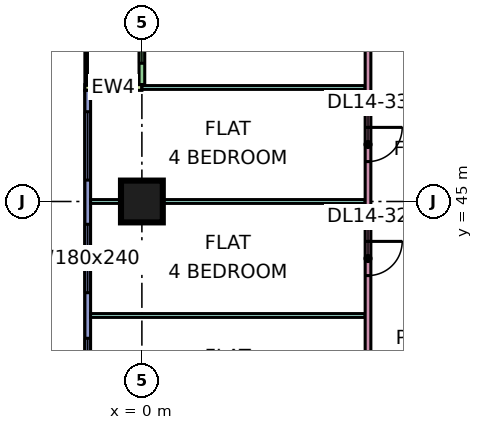
"""IFC4 building model, lengths in metres.
Left out: names, types, materials, properties, quantities, classifications, styles, units other than length and angle.
Written with IfcOpenShell. Run it as: python <this file> out.ifc"""

import sys

from ifc_helpers import new_model, si_unit, direction, frame, frame_2d, origin, origin_2d, place, context, subcontext, project, spatial, rectangle, extrude, element, fill, save


model = new_model("IFC4")
c1 = context("Model", 3, precision=1e-05, world=origin(), true_north=direction((0.0, 1.0)))
c2 = subcontext(c1, "Body", "Model", "MODEL_VIEW")
j1 = project(units=[si_unit("LENGTHUNIT", "METRE"), si_unit("PLANEANGLEUNIT", "RADIAN")], contexts=[c1])
p1 = place(None, origin())
s1 = spatial("IfcSite", under=j1, at=p1, CompositionType="ELEMENT")
p2 = place(p1, origin())
s2 = spatial("IfcBuilding", under=s1, at=p2, CompositionType="ELEMENT")
p3 = place(p2, frame((0.0, 0.0, 67.65)))
s3 = spatial("IfcBuildingStorey", under=s2, at=p3, CompositionType="ELEMENT", Elevation=67.65)
p4 = place(p3, frame((0.0, 45.0, 0.0), z_axis=(0.0, 0.0, 1.0), x_axis=(1.0, 0.0, 0.0)))
e1 = element("IfcColumn", 1, at=p4, inside=s3, PredefinedType="COLUMN", context=c2, shape_type="SweptSolid", body=[
    extrude(rectangle(XDim=1.1, YDim=1.1, at=origin_2d()), origin(), (0.0, 0.0, 1.0), 3.75),
])
p5 = place(p3, frame((0.0, 61.425, 0.0), z_axis=(0.0, 0.0, 1.0), x_axis=(0.0, -1.0, 0.0)))
e2 = element("IfcWall", 2, at=p5, inside=s3, PredefinedType="SOLIDWALL", context=c2, shape_type="SweptSolid", body=[
    extrude(rectangle(XDim=13.35, YDim=0.15, at=frame_2d((6.675, 0.0))), origin(), (0.0, 0.0, 1.0), 3.35),
])
p6 = place(p5, frame((1.312, 0.0, 0.0)))
e3 = element("IfcOpeningElement", 3, at=p6, cuts=e2, PredefinedType="OPENING", context=c2, shape_type="SweptSolid", body=[
    extrude(rectangle(XDim=1.8, YDim=2.4, at=frame_2d((0.9, 1.2))), frame((0.0, 0.085, 0.0), z_axis=(0.0, -1.0, 0.0), x_axis=(1.0, 0.0, 0.0)), (0.0, 0.0, 1.0), 0.17),
])
p7 = place(p5, frame((5.0, 0.0, 0.45)))
e4 = element("IfcOpeningElement", 4, at=p7, cuts=e2, PredefinedType="OPENING", context=c2, shape_type="SweptSolid", body=[
    extrude(rectangle(XDim=1.2, YDim=2.4, at=frame_2d((0.6, 1.2))), frame((0.0, 0.085, 0.0), z_axis=(0.0, -1.0, 0.0), x_axis=(1.0, 0.0, 0.0)), (0.0, 0.0, 1.0), 0.17),
])
p8 = place(p5, frame((8.65, 0.0, 0.45)))
e5 = element("IfcOpeningElement", 5, at=p8, cuts=e2, PredefinedType="OPENING", context=c2, shape_type="SweptSolid", body=[
    extrude(rectangle(XDim=1.2, YDim=2.4, at=frame_2d((0.6, 1.2))), frame((0.0, 0.085, 0.0), z_axis=(0.0, -1.0, 0.0), x_axis=(1.0, 0.0, 0.0)), (0.0, 0.0, 1.0), 0.17),
])
p9 = place(p5, frame((10.988, 0.0, 0.45)))
e6 = element("IfcOpeningElement", 6, at=p9, cuts=e2, PredefinedType="OPENING", context=c2, shape_type="SweptSolid", body=[
    extrude(rectangle(XDim=1.8, YDim=2.4, at=frame_2d((0.9, 1.2))), frame((0.0, 0.085, 0.0), z_axis=(0.0, -1.0, 0.0), x_axis=(1.0, 0.0, 0.0)), (0.0, 0.0, 1.0), 0.17),
])
p10 = place(p3, frame((-1.5, 48.0, 0.0), z_axis=(0.0, 0.0, 1.0), x_axis=(1.0, 0.0, 0.0)))
e7 = element("IfcWall", 7, at=p10, inside=s3, PredefinedType="SOLIDWALL", context=c2, shape_type="SweptSolid", body=[
    extrude(rectangle(XDim=1.5, YDim=0.15, at=frame_2d((0.75, 0.0))), origin(), (0.0, 0.0, 1.0), 3.35),
])
p11 = place(p3, frame((-1.425, 47.925, 0.0), z_axis=(0.0, 0.0, 1.0), x_axis=(0.0, -1.0, 0.0)))
e8 = element("IfcWall", 8, at=p11, inside=s3, PredefinedType="SOLIDWALL", context=c2, shape_type="SweptSolid", body=[
    extrude(rectangle(XDim=11.85, YDim=0.15, at=frame_2d((5.925, 0.0))), origin(), (0.0, 0.0, 1.0), 3.35),
])
p12 = place(p11, frame((0.562, 0.0, 0.45)))
e9 = element("IfcOpeningElement", 9, at=p12, cuts=e8, PredefinedType="OPENING", context=c2, shape_type="SweptSolid", body=[
    extrude(rectangle(XDim=1.8, YDim=2.4, at=frame_2d((0.9, 1.2))), frame((0.0, 0.085, 0.0), z_axis=(0.0, -1.0, 0.0), x_axis=(1.0, 0.0, 0.0)), (0.0, 0.0, 1.0), 0.17),
])
p13 = place(p11, frame((3.525, 0.0, 0.45)))
e10 = element("IfcOpeningElement", 10, at=p13, cuts=e8, PredefinedType="OPENING", context=c2, shape_type="SweptSolid", body=[
    extrude(rectangle(XDim=1.8, YDim=2.4, at=frame_2d((0.9, 1.2))), frame((0.0, 0.085, 0.0), z_axis=(0.0, -1.0, 0.0), x_axis=(1.0, 0.0, 0.0)), (0.0, 0.0, 1.0), 0.17),
])
p14 = place(p11, frame((6.525, 0.0, 0.45)))
e11 = element("IfcOpeningElement", 11, at=p14, cuts=e8, PredefinedType="OPENING", context=c2, shape_type="SweptSolid", body=[
    extrude(rectangle(XDim=1.8, YDim=2.4, at=frame_2d((0.9, 1.2))), frame((0.0, 0.085, 0.0), z_axis=(0.0, -1.0, 0.0), x_axis=(1.0, 0.0, 0.0)), (0.0, 0.0, 1.0), 0.17),
])
p15 = place(p11, frame((9.488, 0.0, 0.45)))
e12 = element("IfcOpeningElement", 12, at=p15, cuts=e8, PredefinedType="OPENING", context=c2, shape_type="SweptSolid", body=[
    extrude(rectangle(XDim=1.8, YDim=2.4, at=frame_2d((0.9, 1.2))), frame((0.0, 0.085, 0.0), z_axis=(0.0, -1.0, 0.0), x_axis=(1.0, 0.0, 0.0)), (0.0, 0.0, 1.0), 0.17),
])
for number, where, z_axis, x_axis in (
    (13, (-1.351, 42.0, 0.0), (0.0, 0.0, 1.0), (1.0, 0.0, 0.0)),
    (14, (-1.351, 45.0, 0.0), (0.0, 0.0, 1.0), (1.0, 0.0, 0.0)),
):
    element("IfcWall", number, at=place(p3, frame(where, z_axis=z_axis, x_axis=x_axis)), inside=s3, PredefinedType="PARTITIONING", context=c2, shape_type="SweptSolid", body=[
        extrude(rectangle(XDim=7.226, YDim=0.1, at=frame_2d((3.613, 0.0))), origin(), (0.0, 0.0, 1.0), 3.35),
    ])
p16 = place(p3, frame((0.0, 48.0, 0.0), z_axis=(0.0, 0.0, 1.0), x_axis=(1.0, 0.0, 0.0)))
e15 = element("IfcWall", 15, at=p16, inside=s3, PredefinedType="PARTITIONING", context=c2, shape_type="SweptSolid", body=[
    extrude(rectangle(XDim=5.875, YDim=0.1, at=frame_2d((2.938, 0.0))), origin(), (0.0, 0.0, 1.0), 3.35),
])
p17 = place(p3, frame((5.95, 36.1, 0.0), z_axis=(0.0, 0.0, 1.0), x_axis=(0.0, 1.0, 0.0)))
e16 = element("IfcWall", 16, at=p17, inside=s3, PredefinedType="PARTITIONING", context=c2, shape_type="SweptSolid", body=[
    extrude(rectangle(XDim=26.826, YDim=0.15, at=frame_2d((13.413, 0.0))), origin(), (0.0, 0.0, 1.0), 3.35),
])
p18 = place(p17, frame((0.95, 0.0, 0.0)))
e17 = element("IfcOpeningElement", 17, at=p18, cuts=e16, PredefinedType="OPENING", context=c2, shape_type="SweptSolid", body=[
    extrude(rectangle(XDim=0.9, YDim=2.1, at=frame_2d((0.45, 1.05))), frame((0.0, 0.085, 0.0), z_axis=(0.0, -1.0, 0.0), x_axis=(1.0, 0.0, 0.0)), (0.0, 0.0, 1.0), 0.17),
])
p19 = place(p17, frame((3.95, 0.0, 0.0)))
e18 = element("IfcOpeningElement", 18, at=p19, cuts=e16, PredefinedType="OPENING", context=c2, shape_type="SweptSolid", body=[
    extrude(rectangle(XDim=0.9, YDim=2.1, at=frame_2d((0.45, 1.05))), frame((0.0, 0.085, 0.0), z_axis=(0.0, -1.0, 0.0), x_axis=(1.0, 0.0, 0.0)), (0.0, 0.0, 1.0), 0.17),
])
p20 = place(p17, frame((6.95, 0.0, 0.0)))
e19 = element("IfcOpeningElement", 19, at=p20, cuts=e16, PredefinedType="OPENING", context=c2, shape_type="SweptSolid", body=[
    extrude(rectangle(XDim=0.9, YDim=2.1, at=frame_2d((0.45, 1.05))), frame((0.0, 0.085, 0.0), z_axis=(0.0, -1.0, 0.0), x_axis=(1.0, 0.0, 0.0)), (0.0, 0.0, 1.0), 0.17),
])
p21 = place(p17, frame((9.95, 0.0, 0.0)))
e20 = element("IfcOpeningElement", 20, at=p21, cuts=e16, PredefinedType="OPENING", context=c2, shape_type="SweptSolid", body=[
    extrude(rectangle(XDim=0.9, YDim=2.1, at=frame_2d((0.45, 1.05))), frame((0.0, 0.085, 0.0), z_axis=(0.0, -1.0, 0.0), x_axis=(1.0, 0.0, 0.0)), (0.0, 0.0, 1.0), 0.17),
])
p22 = place(p17, frame((18.95, 0.0, 0.0)))
e21 = element("IfcOpeningElement", 21, at=p22, cuts=e16, PredefinedType="OPENING", context=c2, shape_type="SweptSolid", body=[
    extrude(rectangle(XDim=0.9, YDim=2.1, at=frame_2d((0.45, 1.05))), frame((0.0, 0.085, 0.0), z_axis=(0.0, -1.0, 0.0), x_axis=(1.0, 0.0, 0.0)), (0.0, 0.0, 1.0), 0.17),
])
p23 = place(p17, frame((23.45, 0.0, 0.0)))
e22 = element("IfcOpeningElement", 22, at=p23, cuts=e16, PredefinedType="OPENING", context=c2, shape_type="SweptSolid", body=[
    extrude(rectangle(XDim=0.9, YDim=2.1, at=frame_2d((0.45, 1.05))), frame((0.0, 0.085, 0.0), z_axis=(0.0, -1.0, 0.0), x_axis=(1.0, 0.0, 0.0)), (0.0, 0.0, 1.0), 0.17),
])
p24 = place(p17, frame((15.55, 0.0, 0.0)))
e23 = element("IfcOpeningElement", 23, at=p24, cuts=e16, PredefinedType="OPENING", context=c2, shape_type="SweptSolid", body=[
    extrude(rectangle(XDim=1.6, YDim=2.1, at=frame_2d((0.8, 1.05))), frame((0.0, 0.085, 0.0), z_axis=(0.0, -1.0, 0.0), x_axis=(1.0, 0.0, 0.0)), (0.0, 0.0, 1.0), 0.17),
])
p25 = place(p17, frame((12.95, 0.0, 0.0)))
e24 = element("IfcOpeningElement", 24, at=p25, cuts=e16, PredefinedType="OPENING", context=c2, shape_type="SweptSolid", body=[
    extrude(rectangle(XDim=0.9, YDim=2.1, at=frame_2d((0.45, 1.05))), frame((0.0, 0.085, 0.0), z_axis=(0.0, -1.0, 0.0), x_axis=(1.0, 0.0, 0.0)), (0.0, 0.0, 1.0), 0.17),
])
p26 = place(p9, origin())
e25 = element("IfcWindow", 25, at=p26, inside=s3, PartitioningType="SINGLE_PANEL", PredefinedType="WINDOW", context=c2, shape_type="SweptSolid", body=[
    extrude(rectangle(XDim=1.8, YDim=2.4, at=frame_2d((0.9, 1.2))), frame((0.0, 0.03, 0.0), z_axis=(0.0, -1.0, 0.0), x_axis=(1.0, 0.0, 0.0)), (0.0, 0.0, 1.0), 0.06),
])
fill(e6, e25)
p27 = place(p12, origin())
e26 = element("IfcWindow", 26, at=p27, inside=s3, PartitioningType="SINGLE_PANEL", PredefinedType="WINDOW", context=c2, shape_type="SweptSolid", body=[
    extrude(rectangle(XDim=1.8, YDim=2.4, at=frame_2d((0.9, 1.2))), frame((0.0, 0.03, 0.0), z_axis=(0.0, -1.0, 0.0), x_axis=(1.0, 0.0, 0.0)), (0.0, 0.0, 1.0), 0.06),
])
fill(e9, e26)
p28 = place(p13, origin())
e27 = element("IfcWindow", 27, at=p28, inside=s3, PartitioningType="SINGLE_PANEL", PredefinedType="WINDOW", context=c2, shape_type="SweptSolid", body=[
    extrude(rectangle(XDim=1.8, YDim=2.4, at=frame_2d((0.9, 1.2))), frame((0.0, 0.03, 0.0), z_axis=(0.0, -1.0, 0.0), x_axis=(1.0, 0.0, 0.0)), (0.0, 0.0, 1.0), 0.06),
])
fill(e10, e27)
p29 = place(p14, origin())
e28 = element("IfcWindow", 28, at=p29, inside=s3, PartitioningType="SINGLE_PANEL", PredefinedType="WINDOW", context=c2, shape_type="SweptSolid", body=[
    extrude(rectangle(XDim=1.8, YDim=2.4, at=frame_2d((0.9, 1.2))), frame((0.0, 0.03, 0.0), z_axis=(0.0, -1.0, 0.0), x_axis=(1.0, 0.0, 0.0)), (0.0, 0.0, 1.0), 0.06),
])
fill(e11, e28)
p30 = place(p20, origin())
e29 = element("IfcDoor", 29, at=p30, inside=s3, OperationType="SINGLE_SWING_RIGHT", PredefinedType="DOOR", context=c2, shape_type="SweptSolid", body=[
    extrude(rectangle(XDim=0.9, YDim=2.1, at=frame_2d((0.45, 1.05))), frame((0.0, 0.025, 0.0), z_axis=(0.0, -1.0, 0.0), x_axis=(1.0, 0.0, 0.0)), (0.0, 0.0, 1.0), 0.05),
])
fill(e19, e29)
p31 = place(p21, origin())
e30 = element("IfcDoor", 30, at=p31, inside=s3, OperationType="SINGLE_SWING_RIGHT", PredefinedType="DOOR", context=c2, shape_type="SweptSolid", body=[
    extrude(rectangle(XDim=0.9, YDim=2.1, at=frame_2d((0.45, 1.05))), frame((0.0, 0.025, 0.0), z_axis=(0.0, -1.0, 0.0), x_axis=(1.0, 0.0, 0.0)), (0.0, 0.0, 1.0), 0.05),
])
fill(e20, e30)
save(model, sys.argv[1])
